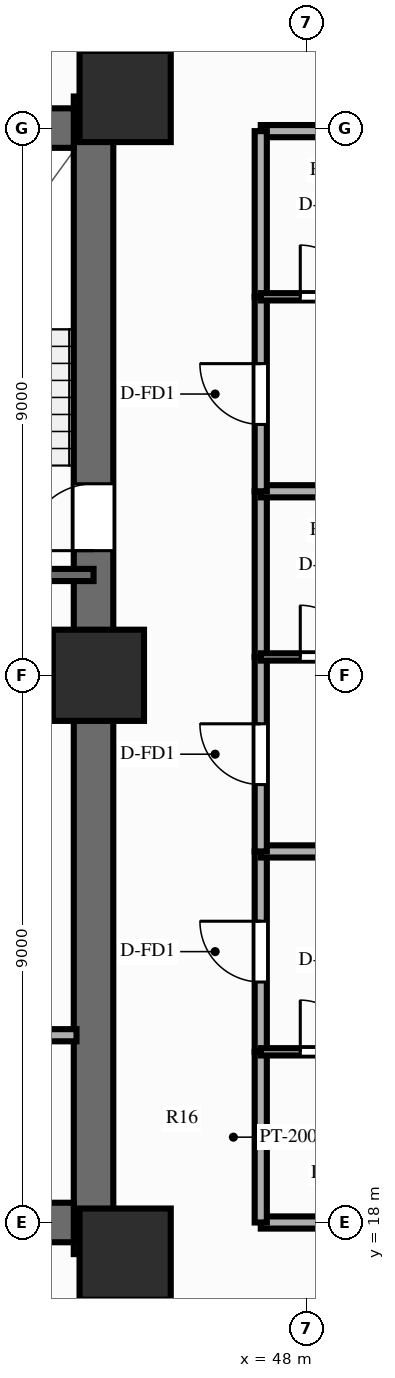
"""IFC4 building model, lengths in metres.
Left out: names, types, materials, properties, quantities, classifications, styles, units other than length and angle.
Written with IfcOpenShell. Run it as: python <this file> out.ifc"""

import sys

from ifc_helpers import new_model, si_unit, direction, frame, frame_2d, origin, origin_2d, place, context, subcontext, project, spatial, rectangle, extrude, source, transform, mapped, element, fill, save


model = new_model("IFC4")
c1 = context("Model", 3, precision=1e-05, world=origin(), true_north=direction((0.0, 1.0)))
c2 = subcontext(c1, "Body", "Model", "MODEL_VIEW")
j1 = project(units=[si_unit("LENGTHUNIT", "METRE"), si_unit("PLANEANGLEUNIT", "RADIAN")], contexts=[c1])
p1 = place(None, origin())
s1 = spatial("IfcSite", under=j1, at=p1, CompositionType="ELEMENT")
p2 = place(p1, origin())
s2 = spatial("IfcBuilding", under=s1, at=p2, CompositionType="ELEMENT")
p3 = place(p2, frame((0.0, 0.0, 43.4)))
s3 = spatial("IfcBuildingStorey", under=s2, at=p3, CompositionType="ELEMENT", Elevation=43.4)
p4 = place(p3, frame((44.5, 17.48, 0.0), z_axis=(0.0, 0.0, 1.0), x_axis=(0.0, 1.0, 0.0)))
e1 = element("IfcWall", 1, at=p4, inside=s3, PredefinedType="SHEAR", context=c2, shape_type="SweptSolid", body=[
    extrude(rectangle(XDim=19.04, YDim=0.65, at=frame_2d((9.52, 0.0))), origin(), (0.0, 0.0, 1.0), 3.0),
])
p5 = place(p4, frame((12.67, 0.0, 0.0), z_axis=(0.0, 0.0, 1.0), x_axis=(-1.0, 0.0, 0.0)))
e2 = element("IfcOpeningElement", 2, at=p5, cuts=e1, PredefinedType="OPENING", context=c2, shape_type="SweptSolid", body=[
    extrude(rectangle(XDim=1.1, YDim=2.15, at=frame_2d((0.55, 1.075))), frame((0.0, 0.337, 0.0), z_axis=(0.0, -1.0, 0.0), x_axis=(1.0, 0.0, 0.0)), (0.0, 0.0, 1.0), 0.674),
])
p6 = place(p3, frame((31.825, 18.0, 0.0), z_axis=(0.0, 0.0, 1.0), x_axis=(1.0, 0.0, 0.0)))
e3 = element("IfcWall", 3, at=p6, inside=s3, PredefinedType="SHEAR", context=c2, shape_type="SweptSolid", body=[
    extrude(rectangle(XDim=12.35, YDim=0.65, at=frame_2d((6.175, 0.0))), origin(), (0.0, 0.0, 1.0), 3.0),
])
p7 = place(p3, frame((31.825, 36.0, 0.0), z_axis=(0.0, 0.0, 1.0), x_axis=(1.0, 0.0, 0.0)))
e4 = element("IfcWall", 4, at=p7, inside=s3, PredefinedType="SHEAR", context=c2, shape_type="SweptSolid", body=[
    extrude(rectangle(XDim=12.35, YDim=0.65, at=frame_2d((6.175, 0.0))), origin(), (0.0, 0.0, 1.0), 3.0),
])
p8 = place(p7, frame((5.125, 0.0, 0.0), z_axis=(0.0, 0.0, 1.0), x_axis=(-1.0, 0.0, 0.0)))
e5 = element("IfcOpeningElement", 5, at=p8, cuts=e4, PredefinedType="OPENING", context=c2, shape_type="SweptSolid", body=[
    extrude(rectangle(XDim=1.4, YDim=2.15, at=frame_2d((0.7, 1.075))), frame((0.0, 0.337, 0.0), z_axis=(0.0, -1.0, 0.0), x_axis=(1.0, 0.0, 0.0)), (0.0, 0.0, 1.0), 0.674),
])
m1 = source(origin(), c2, "Body", "SweptSolid", [
    extrude(rectangle(XDim=1.5, YDim=1.5, at=origin_2d()), origin(), (0.0, 0.0, 1.0), 3.0),
])
for number, where, z_axis, x_axis in (
    (6, (45.02, 17.48, 0.0), (0.0, 0.0, 1.0), (1.0, 0.0, 0.0)),
    (7, (45.02, 36.52, 0.0), (0.0, 0.0, 1.0), (1.0, 0.0, 0.0)),
    (8, (44.58, 27.0, 0.0), (0.0, 0.0, 1.0), (1.0, 0.0, 0.0)),
):
    element("IfcColumn", number, at=place(p3, frame(where, z_axis=z_axis, x_axis=x_axis)), inside=s3, PredefinedType="COLUMN", context=c2, shape_type="MappedRepresentation", body=[
        mapped(m1, transform((0.0, 0.0, 0.0), scale=1.0)),
    ])
p9 = place(p3, frame((42.88, 21.08, 0.0), z_axis=(0.0, 0.0, 1.0), x_axis=(1.0, 0.0, 0.0)))
e9 = element("IfcWall", 9, at=p9, inside=s3, PredefinedType="PARTITIONING", context=c2, shape_type="SweptSolid", body=[
    extrude(rectangle(XDim=1.34, YDim=0.2, at=frame_2d((0.67, 0.0))), origin(), (0.0, 0.0, 1.0), 2.79),
])
p10 = place(p3, frame((40.57, 28.65, 0.0), z_axis=(0.0, 0.0, 1.0), x_axis=(1.0, 0.0, 0.0)))
e10 = element("IfcWall", 10, at=p10, inside=s3, PredefinedType="SOLIDWALL", context=c2, shape_type="SweptSolid", body=[
    extrude(rectangle(XDim=3.93, YDim=0.2, at=frame_2d((1.965, 0.0))), origin(), (0.0, 0.0, 1.0), 2.79),
])
for number, where, z_axis, x_axis in (
    (11, (47.25, 18.0, 0.0), (0.0, 0.0, 1.0), (1.0, 0.0, 0.0)),
    (12, (47.25, 35.95, 0.0), (0.0, 0.0, 1.0), (1.0, 0.0, 0.0)),
):
    element("IfcWall", number, at=place(p3, frame(where, z_axis=z_axis, x_axis=x_axis)), inside=s3, PredefinedType="PARTITIONING", context=c2, shape_type="SweptSolid", body=[
        extrude(rectangle(XDim=16.6, YDim=0.2, at=frame_2d((8.3, 0.0))), origin(), (0.0, 0.0, 1.0), 2.24),
    ])
p11 = place(p3, frame((47.25, 18.0, 0.0), z_axis=(0.0, 0.0, 1.0), x_axis=(0.0, 1.0, 0.0)))
e13 = element("IfcWall", 13, at=p11, inside=s3, PredefinedType="PARTITIONING", context=c2, shape_type="SweptSolid", body=[
    extrude(rectangle(XDim=2.807, YDim=0.2, at=frame_2d((1.404, 0.0))), origin(), (0.0, 0.0, 1.0), 2.79),
])
p12 = place(p3, frame((47.25, 20.807, 0.0), z_axis=(0.0, 0.0, 1.0), x_axis=(0.0, 1.0, 0.0)))
e14 = element("IfcWall", 14, at=p12, inside=s3, PredefinedType="PARTITIONING", context=c2, shape_type="SweptSolid", body=[
    extrude(rectangle(XDim=3.296, YDim=0.2, at=frame_2d((1.648, 0.0))), origin(), (0.0, 0.0, 1.0), 2.79),
])
p13 = place(p12, frame((1.148, 0.0, 0.0)))
e15 = element("IfcOpeningElement", 15, at=p13, cuts=e14, PredefinedType="OPENING", context=c2, shape_type="SweptSolid", body=[
    extrude(rectangle(XDim=1.0, YDim=2.15, at=frame_2d((0.5, 1.075))), frame((0.0, 0.112, 0.0), z_axis=(0.0, -1.0, 0.0), x_axis=(1.0, 0.0, 0.0)), (0.0, 0.0, 1.0), 0.224),
])
p14 = place(p3, frame((47.25, 20.807, 0.0), z_axis=(0.0, 0.0, 1.0), x_axis=(1.0, 0.0, 0.0)))
e16 = element("IfcWall", 16, at=p14, inside=s3, PredefinedType="PARTITIONING", context=c2, shape_type="SweptSolid", body=[
    extrude(rectangle(XDim=2.15, YDim=0.12, at=frame_2d((1.075, 0.0))), origin(), (0.0, 0.0, 1.0), 2.79),
])
p15 = place(p14, frame((0.65, 0.0, 0.0)))
e17 = element("IfcOpeningElement", 17, at=p15, cuts=e16, PredefinedType="OPENING", context=c2, shape_type="SweptSolid", body=[
    extrude(rectangle(XDim=0.85, YDim=2.05, at=frame_2d((0.425, 1.025))), frame((0.0, 0.072, 0.0), z_axis=(0.0, -1.0, 0.0), x_axis=(1.0, 0.0, 0.0)), (0.0, 0.0, 1.0), 0.144),
])
p16 = place(p3, frame((47.25, 24.103, 0.0), z_axis=(0.0, 0.0, 1.0), x_axis=(1.0, 0.0, 0.0)))
e18 = element("IfcWall", 18, at=p16, inside=s3, PredefinedType="PARTITIONING", context=c2, shape_type="SweptSolid", body=[
    extrude(rectangle(XDim=16.6, YDim=0.2, at=frame_2d((8.3, 0.0))), origin(), (0.0, 0.0, 1.0), 2.79),
])
p17 = place(p3, frame((47.25, 24.103, 0.0), z_axis=(0.0, 0.0, 1.0), x_axis=(0.0, 1.0, 0.0)))
e19 = element("IfcWall", 19, at=p17, inside=s3, PredefinedType="PARTITIONING", context=c2, shape_type="SweptSolid", body=[
    extrude(rectangle(XDim=3.199, YDim=0.2, at=frame_2d((1.599, 0.0))), origin(), (0.0, 0.0, 1.0), 2.79),
])
p18 = place(p17, frame((1.099, 0.0, 0.0)))
e20 = element("IfcOpeningElement", 20, at=p18, cuts=e19, PredefinedType="OPENING", context=c2, shape_type="SweptSolid", body=[
    extrude(rectangle(XDim=1.0, YDim=2.15, at=frame_2d((0.5, 1.075))), frame((0.0, 0.112, 0.0), z_axis=(0.0, -1.0, 0.0), x_axis=(1.0, 0.0, 0.0)), (0.0, 0.0, 1.0), 0.224),
])
p19 = place(p3, frame((47.25, 27.302, 0.0), z_axis=(0.0, 0.0, 1.0), x_axis=(0.0, 1.0, 0.0)))
e21 = element("IfcWall", 21, at=p19, inside=s3, PredefinedType="PARTITIONING", context=c2, shape_type="SweptSolid", body=[
    extrude(rectangle(XDim=2.725, YDim=0.2, at=frame_2d((1.362, 0.0))), origin(), (0.0, 0.0, 1.0), 2.79),
])
p20 = place(p3, frame((47.25, 27.302, 0.0), z_axis=(0.0, 0.0, 1.0), x_axis=(1.0, 0.0, 0.0)))
e22 = element("IfcWall", 22, at=p20, inside=s3, PredefinedType="PARTITIONING", context=c2, shape_type="SweptSolid", body=[
    extrude(rectangle(XDim=2.15, YDim=0.12, at=frame_2d((1.075, 0.0))), origin(), (0.0, 0.0, 1.0), 2.79),
])
p21 = place(p20, frame((0.65, 0.0, 0.0)))
e23 = element("IfcOpeningElement", 23, at=p21, cuts=e22, PredefinedType="OPENING", context=c2, shape_type="SweptSolid", body=[
    extrude(rectangle(XDim=0.85, YDim=2.05, at=frame_2d((0.425, 1.025))), frame((0.0, 0.072, 0.0), z_axis=(0.0, -1.0, 0.0), x_axis=(1.0, 0.0, 0.0)), (0.0, 0.0, 1.0), 0.144),
])
p22 = place(p3, frame((47.25, 30.027, 0.0), z_axis=(0.0, 0.0, 1.0), x_axis=(1.0, 0.0, 0.0)))
e24 = element("IfcWall", 24, at=p22, inside=s3, PredefinedType="PARTITIONING", context=c2, shape_type="SweptSolid", body=[
    extrude(rectangle(XDim=16.6, YDim=0.2, at=frame_2d((8.3, 0.0))), origin(), (0.0, 0.0, 1.0), 2.79),
])
p23 = place(p3, frame((47.25, 30.027, 0.0), z_axis=(0.0, 0.0, 1.0), x_axis=(0.0, 1.0, 0.0)))
e25 = element("IfcWall", 25, at=p23, inside=s3, PredefinedType="PARTITIONING", context=c2, shape_type="SweptSolid", body=[
    extrude(rectangle(XDim=3.198, YDim=0.2, at=frame_2d((1.599, 0.0))), origin(), (0.0, 0.0, 1.0), 2.79),
])
p24 = place(p23, frame((1.099, 0.0, 0.0)))
e26 = element("IfcOpeningElement", 26, at=p24, cuts=e25, PredefinedType="OPENING", context=c2, shape_type="SweptSolid", body=[
    extrude(rectangle(XDim=1.0, YDim=2.15, at=frame_2d((0.5, 1.075))), frame((0.0, 0.112, 0.0), z_axis=(0.0, -1.0, 0.0), x_axis=(1.0, 0.0, 0.0)), (0.0, 0.0, 1.0), 0.224),
])
p25 = place(p3, frame((47.25, 33.225, 0.0), z_axis=(0.0, 0.0, 1.0), x_axis=(0.0, 1.0, 0.0)))
e27 = element("IfcWall", 27, at=p25, inside=s3, PredefinedType="PARTITIONING", context=c2, shape_type="SweptSolid", body=[
    extrude(rectangle(XDim=2.725, YDim=0.2, at=frame_2d((1.362, 0.0))), origin(), (0.0, 0.0, 1.0), 2.79),
])
p26 = place(p3, frame((47.25, 33.225, 0.0), z_axis=(0.0, 0.0, 1.0), x_axis=(1.0, 0.0, 0.0)))
e28 = element("IfcWall", 28, at=p26, inside=s3, PredefinedType="PARTITIONING", context=c2, shape_type="SweptSolid", body=[
    extrude(rectangle(XDim=2.15, YDim=0.12, at=frame_2d((1.075, 0.0))), origin(), (0.0, 0.0, 1.0), 2.79),
])
p27 = place(p26, frame((0.65, 0.0, 0.0)))
e29 = element("IfcOpeningElement", 29, at=p27, cuts=e28, PredefinedType="OPENING", context=c2, shape_type="SweptSolid", body=[
    extrude(rectangle(XDim=0.85, YDim=2.05, at=frame_2d((0.425, 1.025))), frame((0.0, 0.072, 0.0), z_axis=(0.0, -1.0, 0.0), x_axis=(1.0, 0.0, 0.0)), (0.0, 0.0, 1.0), 0.144),
])
m2 = source(origin(), c2, "Body", "SweptSolid", [
    extrude(rectangle(XDim=1.1, YDim=2.15, at=frame_2d((0.55, 1.075))), frame((0.0, 0.025, 0.0), z_axis=(0.0, -1.0, 0.0), x_axis=(1.0, 0.0, 0.0)), (0.0, 0.0, 1.0), 0.05),
])
p28 = place(p5, origin())
e30 = element("IfcDoor", 30, at=p28, inside=s3, OperationType="SINGLE_SWING_RIGHT", PredefinedType="DOOR", context=c2, shape_type="MappedRepresentation", body=[
    mapped(m2, transform((0.0, 0.0, 0.0), scale=1.0)),
])
fill(e2, e30)
m3 = source(origin(), c2, "Body", "SweptSolid", [
    extrude(rectangle(XDim=1.0, YDim=2.15, at=frame_2d((0.5, 1.075))), frame((0.0, 0.025, 0.0), z_axis=(0.0, -1.0, 0.0), x_axis=(1.0, 0.0, 0.0)), (0.0, 0.0, 1.0), 0.05),
])
p29 = place(p13, origin())
e31 = element("IfcDoor", 31, at=p29, inside=s3, OperationType="SINGLE_SWING_RIGHT", PredefinedType="DOOR", context=c2, shape_type="MappedRepresentation", body=[
    mapped(m3, transform((0.0, 0.0, 0.0), scale=1.0)),
])
fill(e15, e31)
m4 = source(origin(), c2, "Body", "SweptSolid", [
    extrude(rectangle(XDim=0.85, YDim=2.05, at=frame_2d((0.425, 1.025))), frame((0.0, 0.025, 0.0), z_axis=(0.0, -1.0, 0.0), x_axis=(1.0, 0.0, 0.0)), (0.0, 0.0, 1.0), 0.05),
])
p30 = place(p15, origin())
e32 = element("IfcDoor", 32, at=p30, inside=s3, OperationType="SINGLE_SWING_LEFT", PredefinedType="DOOR", context=c2, shape_type="MappedRepresentation", body=[
    mapped(m4, transform((0.0, 0.0, 0.0), scale=1.0)),
])
fill(e17, e32)
p31 = place(p18, origin())
e33 = element("IfcDoor", 33, at=p31, inside=s3, OperationType="SINGLE_SWING_RIGHT", PredefinedType="DOOR", context=c2, shape_type="MappedRepresentation", body=[
    mapped(m3, transform((0.0, 0.0, 0.0), scale=1.0)),
])
fill(e20, e33)
p32 = place(p21, origin())
e34 = element("IfcDoor", 34, at=p32, inside=s3, OperationType="SINGLE_SWING_LEFT", PredefinedType="DOOR", context=c2, shape_type="MappedRepresentation", body=[
    mapped(m4, transform((0.0, 0.0, 0.0), scale=1.0)),
])
fill(e23, e34)
p33 = place(p24, origin())
e35 = element("IfcDoor", 35, at=p33, inside=s3, OperationType="SINGLE_SWING_RIGHT", PredefinedType="DOOR", context=c2, shape_type="MappedRepresentation", body=[
    mapped(m3, transform((0.0, 0.0, 0.0), scale=1.0)),
])
fill(e26, e35)
p34 = place(p27, origin())
e36 = element("IfcDoor", 36, at=p34, inside=s3, OperationType="SINGLE_SWING_LEFT", PredefinedType="DOOR", context=c2, shape_type="MappedRepresentation", body=[
    mapped(m4, transform((0.0, 0.0, 0.0), scale=1.0)),
])
fill(e29, e36)
save(model, sys.argv[1])
